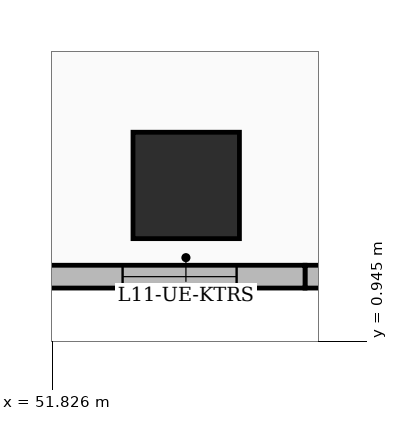
"""IFC4 building model, lengths in metres.
Left out: names, types, materials, properties, quantities, classifications, styles, units other than length and angle.
Written with IfcOpenShell. Run it as: python <this file> out.ifc"""

import sys

from ifc_helpers import new_model, si_unit, direction, frame, frame_2d, origin, origin_2d, place, context, subcontext, project, spatial, rectangle, extrude, element, fill, save


model = new_model("IFC4")
c1 = context("Model", 3, precision=1e-05, world=origin(), true_north=direction((0.0, 1.0)))
c2 = subcontext(c1, "Body", "Model", "MODEL_VIEW")
j1 = project(units=[si_unit("LENGTHUNIT", "METRE"), si_unit("PLANEANGLEUNIT", "RADIAN")], contexts=[c1])
p1 = place(None, origin())
s1 = spatial("IfcSite", under=j1, at=p1, CompositionType="ELEMENT")
p2 = place(p1, origin())
s2 = spatial("IfcBuilding", under=s1, at=p2, CompositionType="ELEMENT")
p3 = place(p2, frame((0.0, 0.0, 49.8)))
s3 = spatial("IfcBuildingStorey", under=s2, at=p3, CompositionType="ELEMENT", Elevation=49.8)
p4 = place(p3, frame((53.584, 3.0, 0.0), z_axis=(0.0, 0.0, 1.0), x_axis=(1.0, 0.0, 0.0)))
e1 = element("IfcColumn", 1, at=p4, inside=s3, PredefinedType="COLUMN", context=c2, shape_type="SweptSolid", body=[
    extrude(rectangle(XDim=1.4, YDim=1.4, at=origin_2d()), origin(), (0.0, 0.0, 1.0), 3.6),
])
p5 = place(p3, frame((61.73, 1.8, 0.0), z_axis=(0.0, 0.0, 1.0), x_axis=(-1.0, 0.0, 0.0)))
e2 = element("IfcWall", 2, at=p5, inside=s3, PredefinedType="SOLIDWALL", context=c2, shape_type="SweptSolid", body=[
    extrude(rectangle(XDim=6.583, YDim=0.3, at=frame_2d((3.292, 0.0))), origin(), (0.0, 0.0, 1.0), 3.35),
])
p6 = place(p5, frame((1.99, 0.0, 0.55)))
e3 = element("IfcOpeningElement", 3, at=p6, cuts=e2, PredefinedType="OPENING", context=c2, shape_type="SweptSolid", body=[
    extrude(rectangle(XDim=1.6, YDim=2.2, at=frame_2d((0.8, 1.1))), frame((0.0, 0.16, 0.0), z_axis=(0.0, -1.0, 0.0), x_axis=(1.0, 0.0, 0.0)), (0.0, 0.0, 1.0), 0.32),
])
p7 = place(p3, frame((55.147, 1.8, 0.0), z_axis=(0.0, 0.0, 1.0), x_axis=(-1.0, 0.0, 0.0)))
e4 = element("IfcWall", 4, at=p7, inside=s3, PredefinedType="SOLIDWALL", context=c2, shape_type="SweptSolid", body=[
    extrude(rectangle(XDim=7.193, YDim=0.3, at=frame_2d((3.596, 0.0))), origin(), (0.0, 0.0, 1.0), 3.35),
])
p8 = place(p7, frame((3.4, 0.0, 0.6)))
e5 = element("IfcOpeningElement", 5, at=p8, cuts=e4, PredefinedType="OPENING", context=c2, shape_type="SweptSolid", body=[
    extrude(rectangle(XDim=1.5, YDim=2.1, at=frame_2d((0.75, 1.05))), frame((0.0, 0.16, 0.0), z_axis=(0.0, -1.0, 0.0), x_axis=(1.0, 0.0, 0.0)), (0.0, 0.0, 1.0), 0.32),
])
p9 = place(p7, frame((0.9, 0.0, 0.6)))
e6 = element("IfcOpeningElement", 6, at=p9, cuts=e4, PredefinedType="OPENING", context=c2, shape_type="SweptSolid", body=[
    extrude(rectangle(XDim=1.5, YDim=2.1, at=frame_2d((0.75, 1.05))), frame((0.0, 0.16, 0.0), z_axis=(0.0, -1.0, 0.0), x_axis=(1.0, 0.0, 0.0)), (0.0, 0.0, 1.0), 0.32),
])
p10 = place(p9, origin())
e7 = element("IfcWindow", 7, at=p10, inside=s3, PartitioningType="SINGLE_PANEL", PredefinedType="WINDOW", context=c2, shape_type="SweptSolid", body=[
    extrude(rectangle(XDim=1.5, YDim=2.1, at=frame_2d((0.75, 1.05))), frame((0.0, 0.03, 0.0), z_axis=(0.0, -1.0, 0.0), x_axis=(1.0, 0.0, 0.0)), (0.0, 0.0, 1.0), 0.06),
])
fill(e6, e7)
save(model, sys.argv[1])
